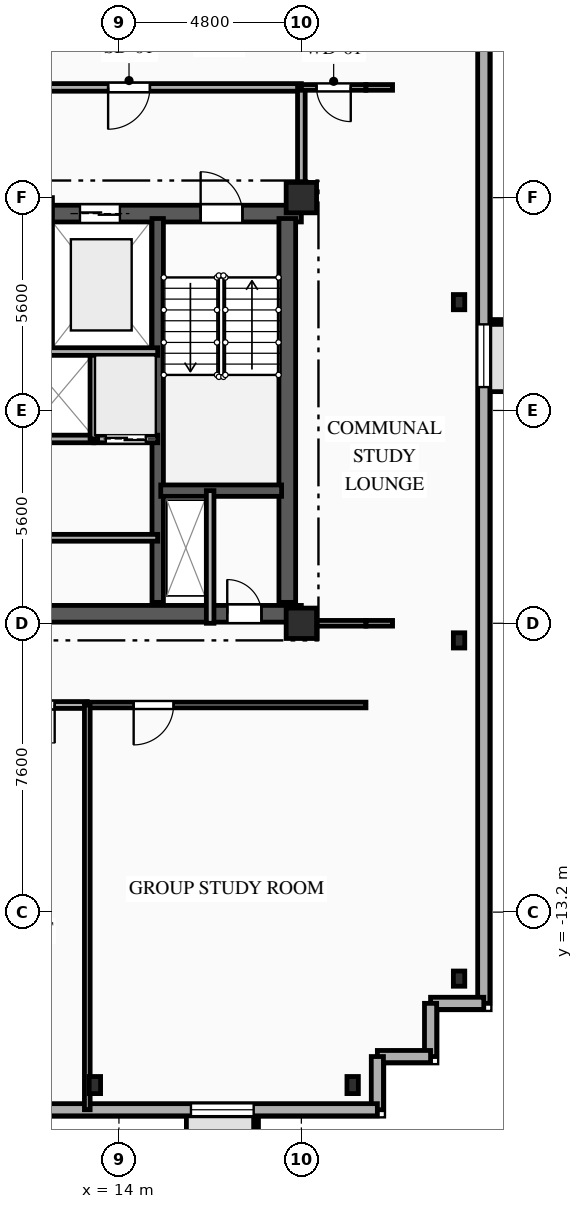
"""IFC4 building model, lengths in metres.
Left out: names, types, materials, properties, quantities, classifications, styles, units other than length and angle.
Written with IfcOpenShell. Run it as: python <this file> out.ifc"""

import sys

from ifc_helpers import new_model, si_unit, direction, frame, frame_2d, origin, origin_2d, place, context, subcontext, project, spatial, rectangle, i_section, extrude, element, fill, save


model = new_model("IFC4")
c1 = context("Model", 3, precision=1e-05, world=origin(), true_north=direction((0.0, 1.0)))
c2 = subcontext(c1, "Body", "Model", "MODEL_VIEW")
j1 = project(units=[si_unit("LENGTHUNIT", "METRE"), si_unit("PLANEANGLEUNIT", "RADIAN")], contexts=[c1])
p1 = place(None, origin())
s1 = spatial("IfcSite", under=j1, at=p1, CompositionType="ELEMENT")
p2 = place(p1, origin())
s2 = spatial("IfcBuilding", under=s1, at=p2, CompositionType="ELEMENT")
p3 = place(p2, frame((0.0, 0.0, 248.4)))
s3 = spatial("IfcBuildingStorey", under=s2, at=p3, CompositionType="ELEMENT", Elevation=248.4)
for number, where, z_axis, x_axis in (
    (1, (18.8, -5.6, 0.0), (0.0, 0.0, 1.0), (1.0, 0.0, 0.0)),
    (2, (18.8, 5.6, 0.0), (0.0, 0.0, 1.0), (1.0, 0.0, 0.0)),
):
    element("IfcColumn", number, at=place(p3, frame(where, z_axis=z_axis, x_axis=x_axis)), inside=s3, PredefinedType="COLUMN", context=c2, shape_type="SweptSolid", body=[
        extrude(rectangle(XDim=0.8, YDim=0.8, at=origin_2d()), origin(), (0.0, 0.0, 1.0), 3.35),
    ])
for number, where, z_axis, x_axis in (
    (3, (13.367, -17.75, 0.0), (0.0, 0.0, 1.0), (1.0, 0.0, 0.0)),
    (4, (20.15, -17.75, 0.0), (0.0, 0.0, 1.0), (1.0, 0.0, 0.0)),
):
    element("IfcColumn", number, at=place(p3, frame(where, z_axis=z_axis, x_axis=x_axis)), inside=s3, PredefinedType="COLUMN", context=c2, shape_type="SweptSolid", body=[
        extrude(i_section(OverallWidth=0.3, OverallDepth=0.45, WebThickness=0.014, FlangeThickness=0.026, FilletRadius=0.027, at=origin_2d()), origin(), (0.0, 0.0, 1.0), 3.35),
    ])
for number, where, z_axis, x_axis in (
    (5, (22.95, -14.95, 0.0), (0.0, 0.0, 1.0), (1.0, 0.0, 0.0)),
    (6, (22.95, -6.05, 0.0), (0.0, 0.0, 1.0), (1.0, 0.0, 0.0)),
    (7, (22.95, 2.85, 0.0), (0.0, 0.0, 1.0), (1.0, 0.0, 0.0)),
):
    element("IfcColumn", number, at=place(p3, frame(where, z_axis=z_axis, x_axis=x_axis)), inside=s3, PredefinedType="COLUMN", context=c2, shape_type="SweptSolid", body=[
        extrude(i_section(OverallWidth=0.3, OverallDepth=0.4, WebThickness=0.013, FlangeThickness=0.024, FilletRadius=0.027, at=origin_2d()), origin(), (0.0, 0.0, 1.0), 3.35),
    ])
p4 = place(p3, frame((23.6, 12.4, 0.0), z_axis=(0.0, 0.0, 1.0), x_axis=(0.0, -1.0, 0.0)))
e8 = element("IfcWall", 8, at=p4, inside=s3, PredefinedType="SOLIDWALL", context=c2, shape_type="SweptSolid", body=[
    extrude(rectangle(XDim=28.0, YDim=0.32, at=frame_2d((14.0, 0.0))), origin(), (0.0, 0.0, 1.0), 3.04),
])
p5 = place(p4, frame((10.135, 0.0, 0.85)))
e9 = element("IfcOpeningElement", 9, at=p5, cuts=e8, PredefinedType="OPENING", context=c2, shape_type="SweptSolid", body=[
    extrude(rectangle(XDim=1.65, YDim=1.85, at=frame_2d((0.825, 0.925))), frame((0.0, 0.17, 0.0), z_axis=(0.0, -1.0, 0.0), x_axis=(1.0, 0.0, 0.0)), (0.0, 0.0, 1.0), 0.34),
])
p6 = place(p3, frame((23.6, -15.6, 0.0), z_axis=(0.0, 0.0, 1.0), x_axis=(-1.0, 0.0, 0.0)))
e10 = element("IfcWall", 10, at=p6, inside=s3, PredefinedType="SOLIDWALL", context=c2, shape_type="SweptSolid", body=[
    extrude(rectangle(XDim=1.4, YDim=0.32, at=frame_2d((0.7, 0.0))), origin(), (0.0, 0.0, 1.0), 3.04),
])
for number, where, z_axis, x_axis in (
    (11, (22.2, -15.6, 0.0), (0.0, 0.0, 1.0), (0.0, -1.0, 0.0)),
    (12, (22.2, -17.0, 0.0), (0.0, 0.0, 1.0), (-1.0, 0.0, 0.0)),
    (13, (20.8, -17.0, 0.0), (0.0, 0.0, 1.0), (0.0, -1.0, 0.0)),
):
    element("IfcWall", number, at=place(p3, frame(where, z_axis=z_axis, x_axis=x_axis)), inside=s3, PredefinedType="SOLIDWALL", context=c2, shape_type="SweptSolid", body=[
        extrude(rectangle(XDim=1.4, YDim=0.32, at=frame_2d((0.7, 0.0))), origin(), (0.0, 0.0, 1.0), 3.04),
    ])
p7 = place(p3, frame((20.8, -18.4, 0.0), z_axis=(0.0, 0.0, 1.0), x_axis=(-1.0, 0.0, 0.0)))
e14 = element("IfcWall", 14, at=p7, inside=s3, PredefinedType="SOLIDWALL", context=c2, shape_type="SweptSolid", body=[
    extrude(rectangle(XDim=42.0, YDim=0.32, at=frame_2d((21.0, 0.0))), origin(), (0.0, 0.0, 1.0), 3.04),
])
p8 = place(p7, frame((3.255, 0.0, 0.85)))
e15 = element("IfcOpeningElement", 15, at=p8, cuts=e14, PredefinedType="OPENING", context=c2, shape_type="SweptSolid", body=[
    extrude(rectangle(XDim=1.65, YDim=1.85, at=frame_2d((0.825, 0.925))), frame((0.0, 0.17, 0.0), z_axis=(0.0, -1.0, 0.0), x_axis=(1.0, 0.0, 0.0)), (0.0, 0.0, 1.0), 0.34),
])
p9 = place(p7, frame((9.98, 0.0, 0.85)))
e16 = element("IfcOpeningElement", 16, at=p9, cuts=e14, PredefinedType="OPENING", context=c2, shape_type="SweptSolid", body=[
    extrude(rectangle(XDim=2.2, YDim=1.85, at=frame_2d((1.1, 0.925))), frame((0.0, 0.17, 0.0), z_axis=(0.0, -1.0, 0.0), x_axis=(1.0, 0.0, 0.0)), (0.0, 0.0, 1.0), 0.34),
])
p10 = place(p7, frame((16.82, 0.0, 0.85)))
e17 = element("IfcOpeningElement", 17, at=p10, cuts=e14, PredefinedType="OPENING", context=c2, shape_type="SweptSolid", body=[
    extrude(rectangle(XDim=2.2, YDim=1.85, at=frame_2d((1.1, 0.925))), frame((0.0, 0.17, 0.0), z_axis=(0.0, -1.0, 0.0), x_axis=(1.0, 0.0, 0.0)), (0.0, 0.0, 1.0), 0.34),
])
p11 = place(p7, frame((23.66, 0.0, 0.85)))
e18 = element("IfcOpeningElement", 18, at=p11, cuts=e14, PredefinedType="OPENING", context=c2, shape_type="SweptSolid", body=[
    extrude(rectangle(XDim=2.2, YDim=1.85, at=frame_2d((1.1, 0.925))), frame((0.0, 0.17, 0.0), z_axis=(0.0, -1.0, 0.0), x_axis=(1.0, 0.0, 0.0)), (0.0, 0.0, 1.0), 0.34),
])
p12 = place(p7, frame((30.5, 0.0, 0.85)))
e19 = element("IfcOpeningElement", 19, at=p12, cuts=e14, PredefinedType="OPENING", context=c2, shape_type="SweptSolid", body=[
    extrude(rectangle(XDim=2.2, YDim=1.85, at=frame_2d((1.1, 0.925))), frame((0.0, 0.17, 0.0), z_axis=(0.0, -1.0, 0.0), x_axis=(1.0, 0.0, 0.0)), (0.0, 0.0, 1.0), 0.34),
])
p13 = place(p7, frame((37.375, 0.0, 0.85)))
e20 = element("IfcOpeningElement", 20, at=p13, cuts=e14, PredefinedType="OPENING", context=c2, shape_type="SweptSolid", body=[
    extrude(rectangle(XDim=1.65, YDim=1.85, at=frame_2d((0.825, 0.925))), frame((0.0, 0.17, 0.0), z_axis=(0.0, -1.0, 0.0), x_axis=(1.0, 0.0, 0.0)), (0.0, 0.0, 1.0), 0.34),
])
p14 = place(p3, frame((9.2, 5.18, 0.0), z_axis=(0.0, 0.0, 1.0), x_axis=(1.0, 0.0, 0.0)))
e21 = element("IfcWall", 21, at=p14, inside=s3, PredefinedType="SHEAR", context=c2, shape_type="SweptSolid", body=[
    extrude(rectangle(XDim=9.6, YDim=0.44, at=frame_2d((4.8, 0.0))), origin(), (0.0, 0.0, 1.0), 3.04),
])
p15 = place(p14, frame((6.95, 0.0, 0.0)))
e22 = element("IfcOpeningElement", 22, at=p15, cuts=e21, PredefinedType="OPENING", context=c2, shape_type="SweptSolid", body=[
    extrude(rectangle(XDim=1.1, YDim=2.15, at=frame_2d((0.55, 1.075))), frame((0.0, 0.23, 0.0), z_axis=(0.0, -1.0, 0.0), x_axis=(1.0, 0.0, 0.0)), (0.0, 0.0, 1.0), 0.46),
])
p16 = place(p14, frame((3.775, 0.0, 0.0)))
e23 = element("IfcOpeningElement", 23, at=p16, cuts=e21, PredefinedType="OPENING", context=c2, shape_type="SweptSolid", body=[
    extrude(rectangle(XDim=1.05, YDim=2.1, at=frame_2d((0.525, 1.05))), frame((0.0, 0.23, 0.0), z_axis=(0.0, -1.0, 0.0), x_axis=(1.0, 0.0, 0.0)), (0.0, 0.0, 1.0), 0.46),
])
p17 = place(p3, frame((9.2, -5.35, 0.0), z_axis=(0.0, 0.0, 1.0), x_axis=(1.0, 0.0, 0.0)))
e24 = element("IfcWall", 24, at=p17, inside=s3, PredefinedType="SHEAR", context=c2, shape_type="SweptSolid", body=[
    extrude(rectangle(XDim=9.6, YDim=0.44, at=frame_2d((4.8, 0.0))), origin(), (0.0, 0.0, 1.0), 3.04),
])
p18 = place(p17, frame((7.65, 0.0, 0.0)))
e25 = element("IfcOpeningElement", 25, at=p18, cuts=e24, PredefinedType="OPENING", context=c2, shape_type="SweptSolid", body=[
    extrude(rectangle(XDim=0.9, YDim=2.1, at=frame_2d((0.45, 1.05))), frame((0.0, 0.23, 0.0), z_axis=(0.0, -1.0, 0.0), x_axis=(1.0, 0.0, 0.0)), (0.0, 0.0, 1.0), 0.46),
])
p19 = place(p3, frame((18.43, -5.05, 0.0), z_axis=(0.0, 0.0, 1.0), x_axis=(0.0, 1.0, 0.0)))
e26 = element("IfcWall", 26, at=p19, inside=s3, PredefinedType="SHEAR", context=c2, shape_type="SweptSolid", body=[
    extrude(rectangle(XDim=10.1, YDim=0.44, at=frame_2d((5.05, 0.0))), origin(), (0.0, 0.0, 1.0), 3.04),
])
p20 = place(p3, frame((15.02, -5.05, 0.0), z_axis=(0.0, 0.0, 1.0), x_axis=(0.0, 1.0, 0.0)))
e27 = element("IfcWall", 27, at=p20, inside=s3, PredefinedType="SHEAR", context=c2, shape_type="SweptSolid", body=[
    extrude(rectangle(XDim=10.1, YDim=0.3, at=frame_2d((5.05, 0.0))), origin(), (0.0, 0.0, 1.0), 3.04),
])
p21 = place(p3, frame((15.1, -2.11, 0.0), z_axis=(0.0, 0.0, 1.0), x_axis=(1.0, 0.0, 0.0)))
e28 = element("IfcWall", 28, at=p21, inside=s3, PredefinedType="SHEAR", context=c2, shape_type="SweptSolid", body=[
    extrude(rectangle(XDim=3.18, YDim=0.3, at=frame_2d((1.59, 0.0))), origin(), (0.0, 0.0, 1.0), 3.04),
])
p22 = place(p3, frame((16.4, -2.11, 0.0), z_axis=(0.0, 0.0, 1.0), x_axis=(0.0, -1.0, 0.0)))
e29 = element("IfcWall", 29, at=p22, inside=s3, PredefinedType="PARTITIONING", context=c2, shape_type="SweptSolid", body=[
    extrude(rectangle(XDim=3.49, YDim=0.2, at=frame_2d((1.745, 0.0))), origin(), (0.0, 0.0, 1.0), 3.04),
])
p23 = place(p3, frame((12.15, 5.6, 0.0), z_axis=(0.0, 0.0, 1.0), x_axis=(0.0, -1.0, 0.0)))
e30 = element("IfcWall", 30, at=p23, inside=s3, PredefinedType="PARTITIONING", context=c2, shape_type="SweptSolid", body=[
    extrude(rectangle(XDim=4.05, YDim=0.2, at=frame_2d((2.025, 0.0))), origin(), (0.0, 0.0, 1.0), 3.04),
])
p24 = place(p3, frame((18.8, 8.5, 0.0), z_axis=(0.0, 0.0, 1.0), x_axis=(-1.0, 0.0, 0.0)))
e31 = element("IfcWall", 31, at=p24, inside=s3, PredefinedType="PARTITIONING", context=c2, shape_type="SweptSolid", body=[
    extrude(rectangle(XDim=6.8, YDim=0.2, at=frame_2d((3.4, 0.0))), origin(), (0.0, 0.0, 1.0), 3.04),
])
p25 = place(p24, frame((3.985, 0.0, 0.0)))
e32 = element("IfcOpeningElement", 32, at=p25, cuts=e31, PredefinedType="OPENING", context=c2, shape_type="SweptSolid", body=[
    extrude(rectangle(XDim=1.1, YDim=2.15, at=frame_2d((0.55, 1.075))), frame((0.0, 0.11, 0.0), z_axis=(0.0, -1.0, 0.0), x_axis=(1.0, 0.0, 0.0)), (0.0, 0.0, 1.0), 0.22),
])
p26 = place(p3, frame((18.8, 5.6, 0.0), z_axis=(0.0, 0.0, 1.0), x_axis=(0.0, 1.0, 0.0)))
e33 = element("IfcWall", 33, at=p26, inside=s3, PredefinedType="PARTITIONING", context=c2, shape_type="SweptSolid", body=[
    extrude(rectangle(XDim=2.9, YDim=0.2, at=frame_2d((1.45, 0.0))), origin(), (0.0, 0.0, 1.0), 2.665),
])
p27 = place(p3, frame((9.2, -3.35, 0.0), z_axis=(0.0, 0.0, 1.0), x_axis=(1.0, 0.0, 0.0)))
e34 = element("IfcWall", 34, at=p27, inside=s3, PredefinedType="PARTITIONING", context=c2, shape_type="SweptSolid", body=[
    extrude(rectangle(XDim=5.82, YDim=0.18, at=frame_2d((2.91, 0.0))), origin(), (0.0, 0.0, 1.0), 2.755),
])
p28 = place(p3, frame((13.34, -0.75, 0.0), z_axis=(0.0, 0.0, 1.0), x_axis=(-1.0, 0.0, 0.0)))
e35 = element("IfcWall", 35, at=p28, inside=s3, PredefinedType="PARTITIONING", context=c2, shape_type="SweptSolid", body=[
    extrude(rectangle(XDim=1.88, YDim=0.2, at=frame_2d((0.94, 0.0))), origin(), (0.0, 0.0, 1.0), 3.04),
])
p29 = place(p3, frame((15.02, -0.75, 0.0), z_axis=(0.0, 0.0, 1.0), x_axis=(-1.0, 0.0, 0.0)))
e36 = element("IfcWall", 36, at=p29, inside=s3, PredefinedType="PARTITIONING", context=c2, shape_type="SweptSolid", body=[
    extrude(rectangle(XDim=1.68, YDim=0.2, at=frame_2d((0.84, 0.0))), origin(), (0.0, 0.0, 1.0), 3.04),
])
p30 = place(p29, frame((0.315, 0.0, 0.0)))
e37 = element("IfcOpeningElement", 37, at=p30, cuts=e36, PredefinedType="OPENING", context=c2, shape_type="SweptSolid", body=[
    extrude(rectangle(XDim=1.05, YDim=2.1, at=frame_2d((0.525, 1.05))), frame((0.0, 0.11, 0.0), z_axis=(0.0, -1.0, 0.0), x_axis=(1.0, 0.0, 0.0)), (0.0, 0.0, 1.0), 0.22),
])
p31 = place(p3, frame((13.34, -0.75, 0.0), z_axis=(0.0, 0.0, 1.0), x_axis=(0.0, 1.0, 0.0)))
e38 = element("IfcWall", 38, at=p31, inside=s3, PredefinedType="PARTITIONING", context=c2, shape_type="SweptSolid", body=[
    extrude(rectangle(XDim=2.3, YDim=0.2, at=frame_2d((1.15, 0.0))), origin(), (0.0, 0.0, 1.0), 3.04),
])
p32 = place(p3, frame((20.5, 8.5, 0.0), z_axis=(0.0, 0.0, 1.0), x_axis=(-1.0, 0.0, 0.0)))
e39 = element("IfcWall", 39, at=p32, inside=s3, PredefinedType="PARTITIONING", context=c2, shape_type="SweptSolid", body=[
    extrude(rectangle(XDim=1.7, YDim=0.15, at=frame_2d((0.85, 0.0))), origin(), (0.0, 0.0, 1.0), 3.04),
])
p33 = place(p32, frame((0.4, 0.0, 0.0)))
e40 = element("IfcOpeningElement", 40, at=p33, cuts=e39, PredefinedType="OPENING", context=c2, shape_type="SweptSolid", body=[
    extrude(rectangle(XDim=0.9, YDim=2.1, at=frame_2d((0.45, 1.05))), frame((0.0, 0.085, 0.0), z_axis=(0.0, -1.0, 0.0), x_axis=(1.0, 0.0, 0.0)), (0.0, 0.0, 1.0), 0.17),
])
p34 = place(p3, frame((21.2, 8.5, 0.0), z_axis=(0.0, 0.0, 1.0), x_axis=(-1.0, 0.0, 0.0)))
e41 = element("IfcWall", 41, at=p34, inside=s3, PredefinedType="PARTITIONING", context=c2, shape_type="SweptSolid", body=[
    extrude(rectangle(XDim=0.7, YDim=0.15, at=frame_2d((0.35, 0.0))), origin(), (0.0, 0.0, 1.0), 3.04),
])
p35 = place(p3, frame((18.8, -5.6, 0.0), z_axis=(0.0, 0.0, 1.0), x_axis=(1.0, 0.0, 0.0)))
e42 = element("IfcWall", 42, at=p35, inside=s3, PredefinedType="PARTITIONING", context=c2, shape_type="SweptSolid", body=[
    extrude(rectangle(XDim=1.7, YDim=0.15, at=frame_2d((0.85, 0.0))), origin(), (0.0, 0.0, 1.0), 3.04),
])
p36 = place(p3, frame((20.5, -5.6, 0.0), z_axis=(0.0, 0.0, 1.0), x_axis=(1.0, 0.0, 0.0)))
e43 = element("IfcWall", 43, at=p36, inside=s3, PredefinedType="PARTITIONING", context=c2, shape_type="SweptSolid", body=[
    extrude(rectangle(XDim=0.7, YDim=0.15, at=frame_2d((0.35, 0.0))), origin(), (0.0, 0.0, 1.0), 3.04),
])
p37 = place(p3, frame((13.167, -7.75, 0.0), z_axis=(0.0, 0.0, 1.0), x_axis=(-1.0, 0.0, 0.0)))
e44 = element("IfcWall", 44, at=p37, inside=s3, PredefinedType="PARTITIONING", context=c2, shape_type="SweptSolid", body=[
    extrude(rectangle(XDim=4.384, YDim=0.18, at=frame_2d((2.192, 0.0))), origin(), (0.0, 0.0, 1.0), 3.04),
])
p38 = place(p37, frame((0.858, 0.0, 0.0)))
e45 = element("IfcOpeningElement", 45, at=p38, cuts=e44, PredefinedType="OPENING", context=c2, shape_type="SweptSolid", body=[
    extrude(rectangle(XDim=1.0, YDim=2.15, at=frame_2d((0.5, 1.075))), frame((0.0, 0.1, 0.0), z_axis=(0.0, -1.0, 0.0), x_axis=(1.0, 0.0, 0.0)), (0.0, 0.0, 1.0), 0.2),
])
p39 = place(p3, frame((20.5, -7.75, 0.0), z_axis=(0.0, 0.0, 1.0), x_axis=(-1.0, 0.0, 0.0)))
e46 = element("IfcWall", 46, at=p39, inside=s3, PredefinedType="PARTITIONING", context=c2, shape_type="SweptSolid", body=[
    extrude(rectangle(XDim=7.333, YDim=0.15, at=frame_2d((3.667, 0.0))), origin(), (0.0, 0.0, 1.0), 3.04),
])
p40 = place(p39, frame((5.062, 0.0, 0.0)))
e47 = element("IfcOpeningElement", 47, at=p40, cuts=e46, PredefinedType="OPENING", context=c2, shape_type="SweptSolid", body=[
    extrude(rectangle(XDim=1.05, YDim=2.15, at=frame_2d((0.525, 1.075))), frame((0.0, 0.085, 0.0), z_axis=(0.0, -1.0, 0.0), x_axis=(1.0, 0.0, 0.0)), (0.0, 0.0, 1.0), 0.17),
])
p41 = place(p3, frame((13.167, -7.75, 0.0), z_axis=(0.0, 0.0, 1.0), x_axis=(0.0, -1.0, 0.0)))
e48 = element("IfcWall", 48, at=p41, inside=s3, PredefinedType="PARTITIONING", context=c2, shape_type="SweptSolid", body=[
    extrude(rectangle(XDim=10.65, YDim=0.15, at=frame_2d((5.325, 0.0))), origin(), (0.0, 0.0, 1.0), 3.04),
])
p42 = place(p3, frame((9.2, 1.55, 0.0), z_axis=(0.0, 0.0, 1.0), x_axis=(1.0, 0.0, 0.0)))
e49 = element("IfcWall", 49, at=p42, inside=s3, PredefinedType="PARTITIONING", context=c2, shape_type="SweptSolid", body=[
    extrude(rectangle(XDim=5.82, YDim=0.2, at=frame_2d((2.91, 0.0))), origin(), (0.0, 0.0, 1.0), 3.04),
])
p43 = place(p5, origin())
e50 = element("IfcWindow", 50, at=p43, inside=s3, PartitioningType="SINGLE_PANEL", PredefinedType="WINDOW", context=c2, shape_type="SweptSolid", body=[
    extrude(rectangle(XDim=1.65, YDim=1.85, at=frame_2d((0.825, 0.925))), frame((0.0, 0.03, 0.0), z_axis=(0.0, -1.0, 0.0), x_axis=(1.0, 0.0, 0.0)), (0.0, 0.0, 1.0), 0.06),
])
fill(e9, e50)
p44 = place(p8, origin())
e51 = element("IfcWindow", 51, at=p44, inside=s3, PartitioningType="SINGLE_PANEL", PredefinedType="WINDOW", context=c2, shape_type="SweptSolid", body=[
    extrude(rectangle(XDim=1.65, YDim=1.85, at=frame_2d((0.825, 0.925))), frame((0.0, 0.03, 0.0), z_axis=(0.0, -1.0, 0.0), x_axis=(1.0, 0.0, 0.0)), (0.0, 0.0, 1.0), 0.06),
])
fill(e15, e51)
p45 = place(p15, origin())
e52 = element("IfcDoor", 52, at=p45, inside=s3, OperationType="SINGLE_SWING_LEFT", PredefinedType="DOOR", context=c2, shape_type="SweptSolid", body=[
    extrude(rectangle(XDim=1.1, YDim=2.15, at=frame_2d((0.55, 1.075))), frame((0.0, 0.025, 0.0), z_axis=(0.0, -1.0, 0.0), x_axis=(1.0, 0.0, 0.0)), (0.0, 0.0, 1.0), 0.05),
])
fill(e22, e52)
p46 = place(p16, origin())
e53 = element("IfcDoor", 53, at=p46, inside=s3, OperationType="DOUBLE_DOOR_SLIDING", PredefinedType="DOOR", context=c2, shape_type="SweptSolid", body=[
    extrude(rectangle(XDim=1.05, YDim=2.1, at=frame_2d((0.525, 1.05))), frame((0.0, 0.025, 0.0), z_axis=(0.0, -1.0, 0.0), x_axis=(1.0, 0.0, 0.0)), (0.0, 0.0, 1.0), 0.05),
])
fill(e23, e53)
p47 = place(p18, origin())
e54 = element("IfcDoor", 54, at=p47, inside=s3, OperationType="SINGLE_SWING_LEFT", PredefinedType="DOOR", context=c2, shape_type="SweptSolid", body=[
    extrude(rectangle(XDim=0.9, YDim=2.1, at=frame_2d((0.45, 1.05))), frame((0.0, 0.025, 0.0), z_axis=(0.0, -1.0, 0.0), x_axis=(1.0, 0.0, 0.0)), (0.0, 0.0, 1.0), 0.05),
])
fill(e25, e54)
p48 = place(p25, origin())
e55 = element("IfcDoor", 55, at=p48, inside=s3, OperationType="SINGLE_SWING_RIGHT", PredefinedType="DOOR", context=c2, shape_type="SweptSolid", body=[
    extrude(rectangle(XDim=1.1, YDim=2.15, at=frame_2d((0.55, 1.075))), frame((0.0, 0.025, 0.0), z_axis=(0.0, -1.0, 0.0), x_axis=(1.0, 0.0, 0.0)), (0.0, 0.0, 1.0), 0.05),
])
fill(e32, e55)
p49 = place(p30, origin())
e56 = element("IfcDoor", 56, at=p49, inside=s3, OperationType="DOUBLE_DOOR_SLIDING", PredefinedType="DOOR", context=c2, shape_type="SweptSolid", body=[
    extrude(rectangle(XDim=1.05, YDim=2.1, at=frame_2d((0.525, 1.05))), frame((0.0, 0.025, 0.0), z_axis=(0.0, -1.0, 0.0), x_axis=(1.0, 0.0, 0.0)), (0.0, 0.0, 1.0), 0.05),
])
fill(e37, e56)
p50 = place(p33, origin())
e57 = element("IfcDoor", 57, at=p50, inside=s3, OperationType="SINGLE_SWING_LEFT", PredefinedType="DOOR", context=c2, shape_type="SweptSolid", body=[
    extrude(rectangle(XDim=0.9, YDim=2.1, at=frame_2d((0.45, 1.05))), frame((0.0, 0.025, 0.0), z_axis=(0.0, -1.0, 0.0), x_axis=(1.0, 0.0, 0.0)), (0.0, 0.0, 1.0), 0.05),
])
fill(e40, e57)
p51 = place(p38, origin())
e58 = element("IfcDoor", 58, at=p51, inside=s3, OperationType="SINGLE_SWING_LEFT", PredefinedType="DOOR", context=c2, shape_type="SweptSolid", body=[
    extrude(rectangle(XDim=1.0, YDim=2.15, at=frame_2d((0.5, 1.075))), frame((0.0, 0.025, 0.0), z_axis=(0.0, -1.0, 0.0), x_axis=(1.0, 0.0, 0.0)), (0.0, 0.0, 1.0), 0.05),
])
fill(e45, e58)
p52 = place(p40, origin())
e59 = element("IfcDoor", 59, at=p52, inside=s3, OperationType="SINGLE_SWING_RIGHT", PredefinedType="DOOR", context=c2, shape_type="SweptSolid", body=[
    extrude(rectangle(XDim=1.05, YDim=2.15, at=frame_2d((0.525, 1.075))), frame((0.0, 0.025, 0.0), z_axis=(0.0, -1.0, 0.0), x_axis=(1.0, 0.0, 0.0)), (0.0, 0.0, 1.0), 0.05),
])
fill(e47, e59)
save(model, sys.argv[1])
